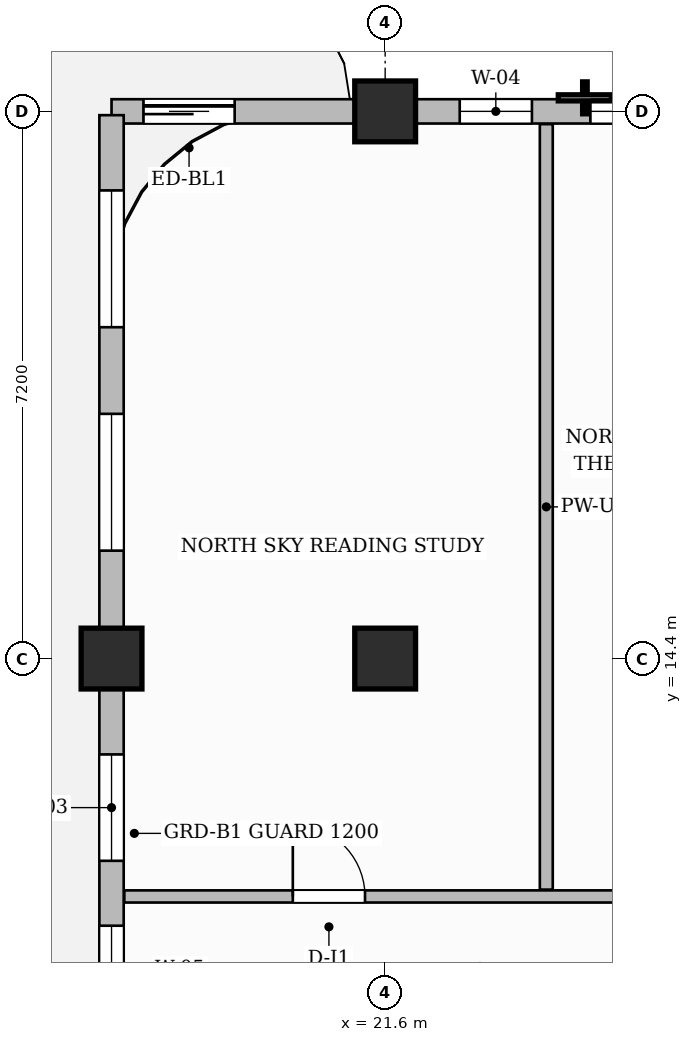
"""IFC4 building model, lengths in metres.
Left out: names, types, materials, properties, quantities, classifications, styles, units other than length and angle.
Written with IfcOpenShell. Run it as: python <this file> out.ifc"""

import sys

from ifc_helpers import new_model, si_unit, direction, frame, frame_2d, origin, origin_2d, place, context, subcontext, project, spatial, rectangle, extrude, source, transform, mapped, element, fill, save


model = new_model("IFC4")
c1 = context("Model", 3, precision=1e-05, world=origin(), true_north=direction((0.0, 1.0)))
c2 = subcontext(c1, "Body", "Model", "MODEL_VIEW")
j1 = project(units=[si_unit("LENGTHUNIT", "METRE"), si_unit("PLANEANGLEUNIT", "RADIAN")], contexts=[c1])
p1 = place(None, origin())
s1 = spatial("IfcSite", under=j1, at=p1, CompositionType="ELEMENT")
p2 = place(p1, origin())
s2 = spatial("IfcBuilding", under=s1, at=p2, CompositionType="ELEMENT")
p3 = place(p2, frame((0.0, 0.0, 263.5)))
s3 = spatial("IfcBuildingStorey", under=s2, at=p3, CompositionType="ELEMENT", Elevation=263.5)
m1 = source(origin(), c2, "Body", "SweptSolid", [
    extrude(rectangle(XDim=0.8, YDim=0.8, at=origin_2d()), origin(), (0.0, 0.0, 1.0), 3.85),
])
for number, where, z_axis, x_axis in (
    (1, (21.6, 14.4, 0.0), (0.0, 0.0, 1.0), (1.0, 0.0, 0.0)),
    (2, (21.6, 21.6, 0.0), (0.0, 0.0, 1.0), (1.0, 0.0, 0.0)),
    (3, (18.0, 14.4, 0.0), (0.0, 0.0, 1.0), (1.0, 0.0, 0.0)),
):
    element("IfcColumn", number, at=place(p3, frame(where, z_axis=z_axis, x_axis=x_axis)), inside=s3, PredefinedType="COLUMN", context=c2, shape_type="MappedRepresentation", body=[
        mapped(m1, transform((0.0, 0.0, 0.0), scale=1.0)),
    ])
p4 = place(p3, frame((18.168, 11.27, 0.0), z_axis=(0.0, 0.0, 1.0), x_axis=(1.0, 0.0, 0.0)))
e4 = element("IfcWall", 4, at=p4, inside=s3, PredefinedType="PARTITIONING", context=c2, shape_type="SweptSolid", body=[
    extrude(rectangle(XDim=11.942, YDim=0.16, at=frame_2d((5.971, 0.0))), origin(), (0.0, 0.0, 1.0), 3.6),
])
p5 = place(p4, frame((2.217, 0.0, 0.0)))
e5 = element("IfcOpeningElement", 5, at=p5, cuts=e4, PredefinedType="OPENING", context=c2, shape_type="SweptSolid", body=[
    extrude(rectangle(XDim=0.95, YDim=2.15, at=frame_2d((0.475, 1.075))), frame((0.0, 0.09, 0.0), z_axis=(0.0, -1.0, 0.0), x_axis=(1.0, 0.0, 0.0)), (0.0, 0.0, 1.0), 0.18),
])
p6 = place(p4, frame((6.557, 0.0, 0.0)))
e6 = element("IfcOpeningElement", 6, at=p6, cuts=e4, PredefinedType="OPENING", context=c2, shape_type="SweptSolid", body=[
    extrude(rectangle(XDim=0.95, YDim=2.15, at=frame_2d((0.475, 1.075))), frame((0.0, 0.09, 0.0), z_axis=(0.0, -1.0, 0.0), x_axis=(1.0, 0.0, 0.0)), (0.0, 0.0, 1.0), 0.18),
])
p7 = place(p4, frame((9.572, 0.0, 0.0)))
e7 = element("IfcOpeningElement", 7, at=p7, cuts=e4, PredefinedType="OPENING", context=c2, shape_type="SweptSolid", body=[
    extrude(rectangle(XDim=1.4, YDim=2.35, at=frame_2d((0.7, 1.175))), frame((0.0, 0.09, 0.0), z_axis=(0.0, -1.0, 0.0), x_axis=(1.0, 0.0, 0.0)), (0.0, 0.0, 1.0), 0.18),
])
p8 = place(p3, frame((23.72, 11.36, 0.0), z_axis=(0.0, 0.0, 1.0), x_axis=(0.0, 1.0, 0.0)))
e8 = element("IfcWall", 8, at=p8, inside=s3, PredefinedType="PARTITIONING", context=c2, shape_type="SweptSolid", body=[
    extrude(rectangle(XDim=10.072, YDim=0.17, at=frame_2d((5.036, 0.0))), origin(), (0.0, 0.0, 1.0), 3.6),
])
p9 = place(p3, frame((18.0, 21.6, 0.0), z_axis=(0.0, 0.0, 1.0), x_axis=(1.0, 0.0, 0.0)))
e9 = element("IfcWall", 9, at=p9, inside=s3, PredefinedType="SOLIDWALL", context=c2, shape_type="SweptSolid", body=[
    extrude(rectangle(XDim=31.8, YDim=0.32, at=frame_2d((15.9, 0.0))), origin(), (0.0, 0.0, 1.0), 3.185),
])
p10 = place(p9, frame((0.42, 0.0, 0.0)))
e10 = element("IfcOpeningElement", 10, at=p10, cuts=e9, PredefinedType="OPENING", context=c2, shape_type="SweptSolid", body=[
    extrude(rectangle(XDim=1.2, YDim=2.2, at=frame_2d((0.6, 1.1))), frame((0.0, 0.17, 0.0), z_axis=(0.0, -1.0, 0.0), x_axis=(1.0, 0.0, 0.0)), (0.0, 0.0, 1.0), 0.34),
])
p11 = place(p9, frame((4.581, 0.0, 0.8)))
e11 = element("IfcOpeningElement", 11, at=p11, cuts=e9, PredefinedType="OPENING", context=c2, shape_type="SweptSolid", body=[
    extrude(rectangle(XDim=0.95, YDim=1.75, at=frame_2d((0.475, 0.875))), frame((0.0, 0.17, 0.0), z_axis=(0.0, -1.0, 0.0), x_axis=(1.0, 0.0, 0.0)), (0.0, 0.0, 1.0), 0.34),
])
p12 = place(p9, frame((6.3, 0.0, 0.8)))
e12 = element("IfcOpeningElement", 12, at=p12, cuts=e9, PredefinedType="OPENING", context=c2, shape_type="SweptSolid", body=[
    extrude(rectangle(XDim=1.8, YDim=1.85, at=frame_2d((0.9, 0.925))), frame((0.0, 0.17, 0.0), z_axis=(0.0, -1.0, 0.0), x_axis=(1.0, 0.0, 0.0)), (0.0, 0.0, 1.0), 0.34),
])
p13 = place(p9, frame((8.869, 0.0, 0.8)))
e13 = element("IfcOpeningElement", 13, at=p13, cuts=e9, PredefinedType="OPENING", context=c2, shape_type="SweptSolid", body=[
    extrude(rectangle(XDim=0.95, YDim=1.75, at=frame_2d((0.475, 0.875))), frame((0.0, 0.17, 0.0), z_axis=(0.0, -1.0, 0.0), x_axis=(1.0, 0.0, 0.0)), (0.0, 0.0, 1.0), 0.34),
])
p14 = place(p9, frame((13.101, 0.0, 0.8)))
e14 = element("IfcOpeningElement", 14, at=p14, cuts=e9, PredefinedType="OPENING", context=c2, shape_type="SweptSolid", body=[
    extrude(rectangle(XDim=1.8, YDim=1.85, at=frame_2d((0.9, 0.925))), frame((0.0, 0.17, 0.0), z_axis=(0.0, -1.0, 0.0), x_axis=(1.0, 0.0, 0.0)), (0.0, 0.0, 1.0), 0.34),
])
p15 = place(p9, frame((18.125, 0.0, 0.8)))
e15 = element("IfcOpeningElement", 15, at=p15, cuts=e9, PredefinedType="OPENING", context=c2, shape_type="SweptSolid", body=[
    extrude(rectangle(XDim=1.8, YDim=1.85, at=frame_2d((0.9, 0.925))), frame((0.0, 0.17, 0.0), z_axis=(0.0, -1.0, 0.0), x_axis=(1.0, 0.0, 0.0)), (0.0, 0.0, 1.0), 0.34),
])
p16 = place(p9, frame((20.875, 0.0, 0.8)))
e16 = element("IfcOpeningElement", 16, at=p16, cuts=e9, PredefinedType="OPENING", context=c2, shape_type="SweptSolid", body=[
    extrude(rectangle(XDim=1.8, YDim=1.85, at=frame_2d((0.9, 0.925))), frame((0.0, 0.17, 0.0), z_axis=(0.0, -1.0, 0.0), x_axis=(1.0, 0.0, 0.0)), (0.0, 0.0, 1.0), 0.34),
])
p17 = place(p9, frame((25.475, 0.0, 0.8)))
e17 = element("IfcOpeningElement", 17, at=p17, cuts=e9, PredefinedType="OPENING", context=c2, shape_type="SweptSolid", body=[
    extrude(rectangle(XDim=1.8, YDim=1.85, at=frame_2d((0.9, 0.925))), frame((0.0, 0.17, 0.0), z_axis=(0.0, -1.0, 0.0), x_axis=(1.0, 0.0, 0.0)), (0.0, 0.0, 1.0), 0.34),
])
p18 = place(p9, frame((28.525, 0.0, 0.8)))
e18 = element("IfcOpeningElement", 18, at=p18, cuts=e9, PredefinedType="OPENING", context=c2, shape_type="SweptSolid", body=[
    extrude(rectangle(XDim=1.8, YDim=1.85, at=frame_2d((0.9, 0.925))), frame((0.0, 0.17, 0.0), z_axis=(0.0, -1.0, 0.0), x_axis=(1.0, 0.0, 0.0)), (0.0, 0.0, 1.0), 0.34),
])
p19 = place(p3, frame((18.0, 0.05, 0.0), z_axis=(0.0, 0.0, 1.0), x_axis=(0.0, 1.0, 0.0)))
e19 = element("IfcWall", 19, at=p19, inside=s3, PredefinedType="SOLIDWALL", context=c2, shape_type="SweptSolid", body=[
    extrude(rectangle(XDim=21.5, YDim=0.32, at=frame_2d((10.75, 0.0))), origin(), (0.0, 0.0, 1.0), 3.6),
])
p20 = place(p19, frame((0.99, 0.0, 0.8)))
e20 = element("IfcOpeningElement", 20, at=p20, cuts=e19, PredefinedType="OPENING", context=c2, shape_type="SweptSolid", body=[
    extrude(rectangle(XDim=1.8, YDim=1.85, at=frame_2d((0.9, 0.925))), frame((0.0, 0.17, 0.0), z_axis=(0.0, -1.0, 0.0), x_axis=(1.0, 0.0, 0.0)), (0.0, 0.0, 1.0), 0.34),
])
p21 = place(p19, frame((3.93, 0.0, 0.8)))
e21 = element("IfcOpeningElement", 21, at=p21, cuts=e19, PredefinedType="OPENING", context=c2, shape_type="SweptSolid", body=[
    extrude(rectangle(XDim=1.8, YDim=1.85, at=frame_2d((0.9, 0.925))), frame((0.0, 0.17, 0.0), z_axis=(0.0, -1.0, 0.0), x_axis=(1.0, 0.0, 0.0)), (0.0, 0.0, 1.0), 0.34),
])
p22 = place(p19, frame((8.146, 0.0, 0.8)))
e22 = element("IfcOpeningElement", 22, at=p22, cuts=e19, PredefinedType="OPENING", context=c2, shape_type="SweptSolid", body=[
    extrude(rectangle(XDim=0.95, YDim=1.75, at=frame_2d((0.475, 0.875))), frame((0.0, 0.17, 0.0), z_axis=(0.0, -1.0, 0.0), x_axis=(1.0, 0.0, 0.0)), (0.0, 0.0, 1.0), 0.34),
])
p23 = place(p19, frame((9.685, 0.0, 0.8)))
e23 = element("IfcOpeningElement", 23, at=p23, cuts=e19, PredefinedType="OPENING", context=c2, shape_type="SweptSolid", body=[
    extrude(rectangle(XDim=1.15, YDim=1.8, at=frame_2d((0.575, 0.9))), frame((0.0, 0.17, 0.0), z_axis=(0.0, -1.0, 0.0), x_axis=(1.0, 0.0, 0.0)), (0.0, 0.0, 1.0), 0.34),
])
p24 = place(p19, frame((11.689, 0.0, 0.8)))
e24 = element("IfcOpeningElement", 24, at=p24, cuts=e19, PredefinedType="OPENING", context=c2, shape_type="SweptSolid", body=[
    extrude(rectangle(XDim=1.4, YDim=1.85, at=frame_2d((0.7, 0.925))), frame((0.0, 0.17, 0.0), z_axis=(0.0, -1.0, 0.0), x_axis=(1.0, 0.0, 0.0)), (0.0, 0.0, 1.0), 0.34),
])
p25 = place(p19, frame((15.77, 0.0, 0.8)))
e25 = element("IfcOpeningElement", 25, at=p25, cuts=e19, PredefinedType="OPENING", context=c2, shape_type="SweptSolid", body=[
    extrude(rectangle(XDim=1.8, YDim=1.85, at=frame_2d((0.9, 0.925))), frame((0.0, 0.17, 0.0), z_axis=(0.0, -1.0, 0.0), x_axis=(1.0, 0.0, 0.0)), (0.0, 0.0, 1.0), 0.34),
])
p26 = place(p19, frame((18.71, 0.0, 0.8)))
e26 = element("IfcOpeningElement", 26, at=p26, cuts=e19, PredefinedType="OPENING", context=c2, shape_type="SweptSolid", body=[
    extrude(rectangle(XDim=1.8, YDim=1.85, at=frame_2d((0.9, 0.925))), frame((0.0, 0.17, 0.0), z_axis=(0.0, -1.0, 0.0), x_axis=(1.0, 0.0, 0.0)), (0.0, 0.0, 1.0), 0.34),
])
m2 = source(origin(), c2, "Body", "SweptSolid", [
    extrude(rectangle(XDim=0.95, YDim=2.15, at=frame_2d((0.475, 1.075))), frame((0.0, 0.025, 0.0), z_axis=(0.0, -1.0, 0.0), x_axis=(1.0, 0.0, 0.0)), (0.0, 0.0, 1.0), 0.05),
])
p27 = place(p5, origin())
e27 = element("IfcDoor", 27, at=p27, inside=s3, OperationType="SINGLE_SWING_LEFT", PredefinedType="DOOR", context=c2, shape_type="MappedRepresentation", body=[
    mapped(m2, transform((0.0, 0.0, 0.0), scale=1.0)),
])
fill(e5, e27)
m3 = source(origin(), c2, "Body", "SweptSolid", [
    extrude(rectangle(XDim=1.2, YDim=2.2, at=frame_2d((0.6, 1.1))), frame((0.0, 0.025, 0.0), z_axis=(0.0, -1.0, 0.0), x_axis=(1.0, 0.0, 0.0)), (0.0, 0.0, 1.0), 0.05),
])
p28 = place(p10, origin())
e28 = element("IfcDoor", 28, at=p28, inside=s3, OperationType="SLIDING_TO_LEFT", PredefinedType="DOOR", context=c2, shape_type="MappedRepresentation", body=[
    mapped(m3, transform((0.0, 0.0, 0.0), scale=1.0)),
])
fill(e10, e28)
m4 = source(origin(), c2, "Body", "SweptSolid", [
    extrude(rectangle(XDim=0.95, YDim=1.75, at=frame_2d((0.475, 0.875))), frame((0.0, 0.03, 0.0), z_axis=(0.0, -1.0, 0.0), x_axis=(1.0, 0.0, 0.0)), (0.0, 0.0, 1.0), 0.06),
])
p29 = place(p11, origin())
e29 = element("IfcWindow", 29, at=p29, inside=s3, PartitioningType="SINGLE_PANEL", PredefinedType="WINDOW", context=c2, shape_type="MappedRepresentation", body=[
    mapped(m4, transform((0.0, 0.0, 0.0), scale=1.0)),
])
fill(e11, e29)
m5 = source(origin(), c2, "Body", "SweptSolid", [
    extrude(rectangle(XDim=1.8, YDim=1.85, at=frame_2d((0.9, 0.925))), frame((0.0, 0.03, 0.0), z_axis=(0.0, -1.0, 0.0), x_axis=(1.0, 0.0, 0.0)), (0.0, 0.0, 1.0), 0.06),
])
p30 = place(p12, origin())
e30 = element("IfcWindow", 30, at=p30, inside=s3, PartitioningType="DOUBLE_PANEL_VERTICAL", PredefinedType="WINDOW", context=c2, shape_type="MappedRepresentation", body=[
    mapped(m5, transform((0.0, 0.0, 0.0), scale=1.0)),
])
fill(e12, e30)
m6 = source(origin(), c2, "Body", "SweptSolid", [
    extrude(rectangle(XDim=1.15, YDim=1.8, at=frame_2d((0.575, 0.9))), frame((0.0, 0.03, 0.0), z_axis=(0.0, -1.0, 0.0), x_axis=(1.0, 0.0, 0.0)), (0.0, 0.0, 1.0), 0.06),
])
p31 = place(p23, origin())
e31 = element("IfcWindow", 31, at=p31, inside=s3, PartitioningType="SINGLE_PANEL", PredefinedType="WINDOW", context=c2, shape_type="MappedRepresentation", body=[
    mapped(m6, transform((0.0, 0.0, 0.0), scale=1.0)),
])
fill(e23, e31)
m7 = source(origin(), c2, "Body", "SweptSolid", [
    extrude(rectangle(XDim=1.4, YDim=1.85, at=frame_2d((0.7, 0.925))), frame((0.0, 0.03, 0.0), z_axis=(0.0, -1.0, 0.0), x_axis=(1.0, 0.0, 0.0)), (0.0, 0.0, 1.0), 0.06),
])
p32 = place(p24, origin())
e32 = element("IfcWindow", 32, at=p32, inside=s3, PartitioningType="SINGLE_PANEL", PredefinedType="WINDOW", context=c2, shape_type="MappedRepresentation", body=[
    mapped(m7, transform((0.0, 0.0, 0.0), scale=1.0)),
])
fill(e24, e32)
p33 = place(p25, origin())
e33 = element("IfcWindow", 33, at=p33, inside=s3, PartitioningType="DOUBLE_PANEL_VERTICAL", PredefinedType="WINDOW", context=c2, shape_type="MappedRepresentation", body=[
    mapped(m5, transform((0.0, 0.0, 0.0), scale=1.0)),
])
fill(e25, e33)
p34 = place(p26, origin())
e34 = element("IfcWindow", 34, at=p34, inside=s3, PartitioningType="DOUBLE_PANEL_VERTICAL", PredefinedType="WINDOW", context=c2, shape_type="MappedRepresentation", body=[
    mapped(m5, transform((0.0, 0.0, 0.0), scale=1.0)),
])
fill(e26, e34)
save(model, sys.argv[1])
